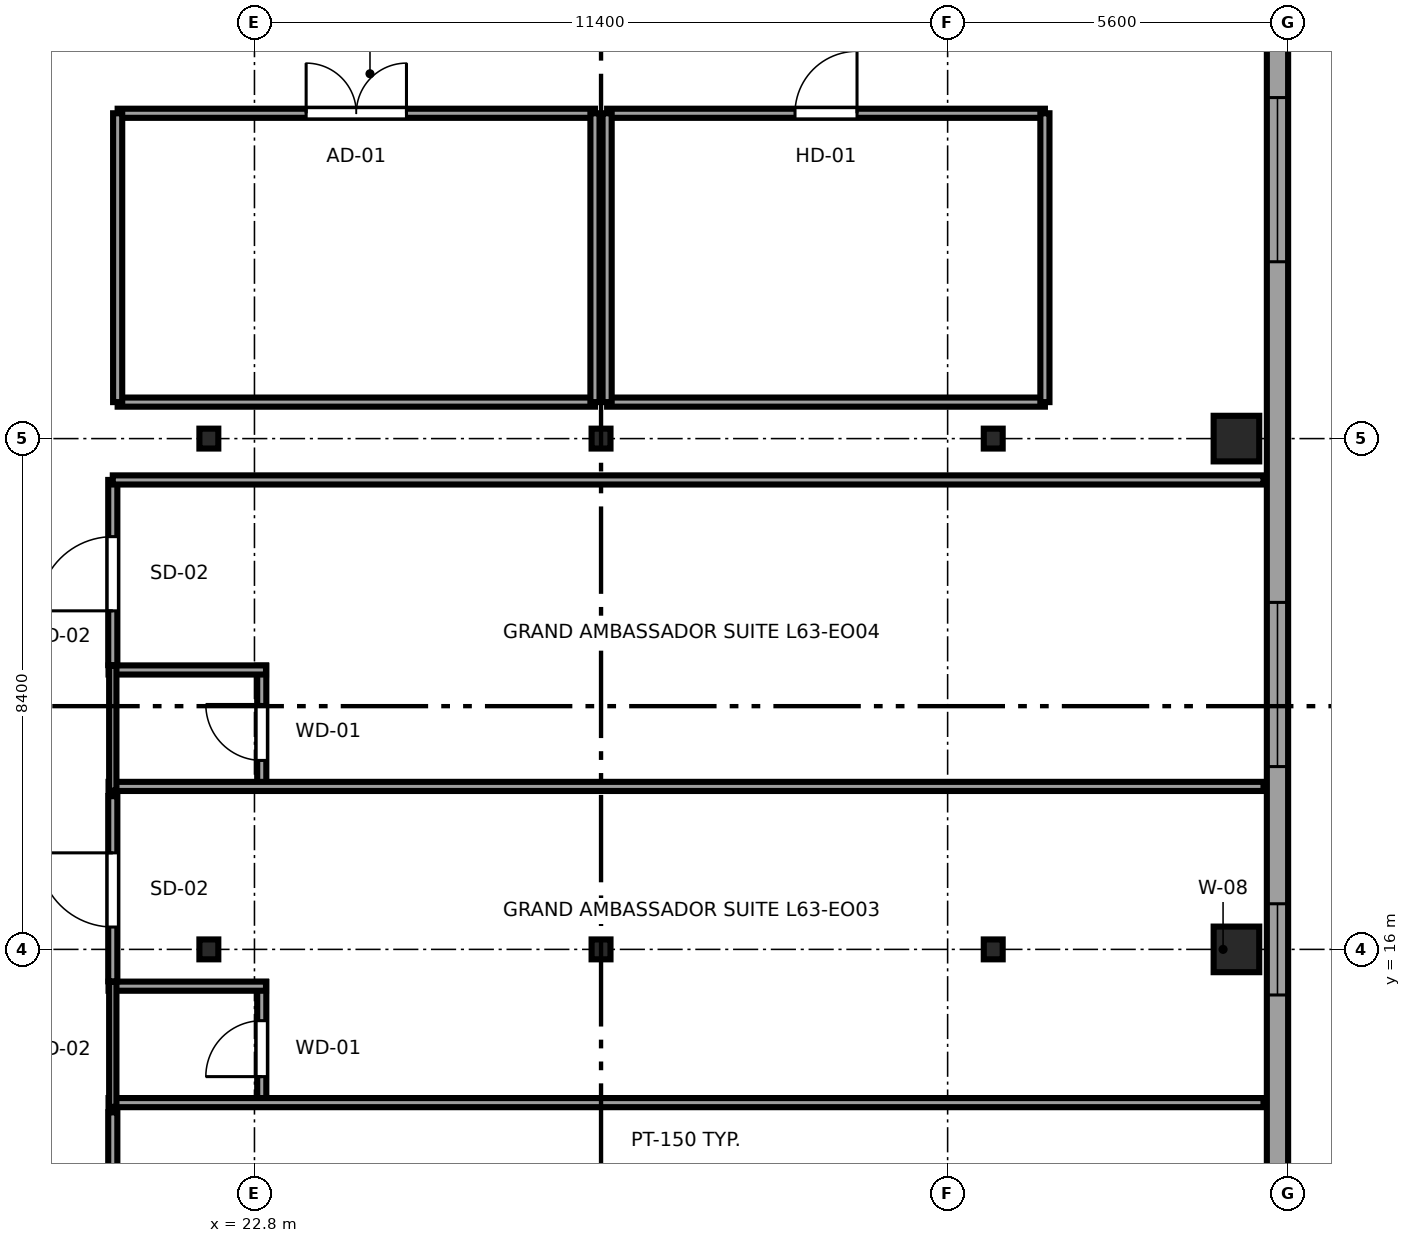
"""IFC4 building model, lengths in metres.
Left out: names, types, materials, properties, quantities, classifications, styles, units other than length and angle.
Written with IfcOpenShell. Run it as: python <this file> out.ifc"""

import sys

from ifc_helpers import new_model, si_unit, direction, frame, frame_2d, origin, origin_2d, place, context, subcontext, project, spatial, rectangle, i_section, extrude, source, transform, mapped, element, fill, save


model = new_model("IFC4")
c1 = context("Model", 3, precision=1e-05, world=origin(), true_north=direction((0.0, 1.0)))
c2 = subcontext(c1, "Body", "Model", "MODEL_VIEW")
j1 = project(units=[si_unit("LENGTHUNIT", "METRE"), si_unit("PLANEANGLEUNIT", "RADIAN")], contexts=[c1])
p1 = place(None, origin())
s1 = spatial("IfcSite", under=j1, at=p1, CompositionType="ELEMENT")
p2 = place(p1, origin())
s2 = spatial("IfcBuilding", under=s1, at=p2, CompositionType="ELEMENT")
p3 = place(p2, frame((0.0, 0.0, 238.1)))
s3 = spatial("IfcBuildingStorey", under=s2, at=p3, CompositionType="ELEMENT", Elevation=238.1)
m1 = source(origin(), c2, "Body", "SweptSolid", [
    extrude(i_section(OverallWidth=0.311, OverallDepth=0.327, WebThickness=0.016, FlangeThickness=0.025, FilletRadius=0.017, at=origin_2d()), origin(), (0.0, 0.0, 1.0), 3.55),
])
for number, where, z_axis, x_axis in (
    (1, (22.05, 16.0, 0.0), (0.0, 0.0, 1.0), (1.0, 0.0, 0.0)),
    (2, (22.05, 24.4, 0.0), (0.0, 0.0, 1.0), (1.0, 0.0, 0.0)),
    (3, (28.5, 16.0, 0.0), (0.0, 0.0, 1.0), (1.0, 0.0, 0.0)),
    (4, (28.5, 24.4, 0.0), (0.0, 0.0, 1.0), (1.0, 0.0, 0.0)),
    (5, (34.95, 16.0, 0.0), (0.0, 0.0, 1.0), (1.0, 0.0, 0.0)),
    (6, (34.95, 24.4, 0.0), (0.0, 0.0, 1.0), (1.0, 0.0, 0.0)),
):
    element("IfcColumn", number, at=place(p3, frame(where, z_axis=z_axis, x_axis=x_axis)), inside=s3, PredefinedType="COLUMN", context=c2, shape_type="MappedRepresentation", body=[
        mapped(m1, transform((0.0, 0.0, 0.0), x_axis=(1.0, 0.0, 0.0), y_axis=(0.0, 1.0, 0.0), z_axis=(0.0, 0.0, 1.0), scale=1.0)),
    ])
m2 = source(origin(), c2, "Body", "SweptSolid", [
    extrude(rectangle(XDim=0.75, YDim=0.75, at=origin_2d()), origin(), (0.0, 0.0, 1.0), 3.55),
])
for number, where, z_axis, x_axis in (
    (7, (38.95, 16.0, 0.0), (0.0, 0.0, 1.0), (1.0, 0.0, 0.0)),
    (8, (38.95, 24.4, 0.0), (0.0, 0.0, 1.0), (1.0, 0.0, 0.0)),
):
    element("IfcColumn", number, at=place(p3, frame(where, z_axis=z_axis, x_axis=x_axis)), inside=s3, PredefinedType="COLUMN", context=c2, shape_type="MappedRepresentation", body=[
        mapped(m2, transform((0.0, 0.0, 0.0), x_axis=(1.0, 0.0, 0.0), y_axis=(0.0, 1.0, 0.0), z_axis=(0.0, 0.0, 1.0), scale=1.0)),
    ])
p4 = place(p3, frame((39.625, 7.017, 0.0), z_axis=(0.0, 0.0, 1.0), x_axis=(0.0, 1.0, 0.0)))
e9 = element("IfcWall", 9, at=p4, inside=s3, PredefinedType="SOLIDWALL", context=c2, shape_type="SweptSolid", body=[
    extrude(rectangle(XDim=24.579, YDim=0.35, at=frame_2d((12.29, 0.0))), origin(), (0.0, 0.0, 1.0), 3.29),
])
p5 = place(p4, frame((2.138, 0.0, 0.68)))
e10 = element("IfcOpeningElement", 10, at=p5, cuts=e9, PredefinedType="OPENING", context=c2, shape_type="SweptSolid", body=[
    extrude(rectangle(XDim=2.7, YDim=1.95, at=frame_2d((1.35, 0.975))), frame((0.0, 0.185, 0.0), z_axis=(0.0, -1.0, 0.0), x_axis=(1.0, 0.0, 0.0)), (0.0, 0.0, 1.0), 0.37),
])
p6 = place(p4, frame((11.989, 0.0, 0.68)))
e11 = element("IfcOpeningElement", 11, at=p6, cuts=e9, PredefinedType="OPENING", context=c2, shape_type="SweptSolid", body=[
    extrude(rectangle(XDim=2.7, YDim=1.95, at=frame_2d((1.35, 0.975))), frame((0.0, 0.185, 0.0), z_axis=(0.0, -1.0, 0.0), x_axis=(1.0, 0.0, 0.0)), (0.0, 0.0, 1.0), 0.37),
])
p7 = place(p4, frame((20.291, 0.0, 0.68)))
e12 = element("IfcOpeningElement", 12, at=p7, cuts=e9, PredefinedType="OPENING", context=c2, shape_type="SweptSolid", body=[
    extrude(rectangle(XDim=2.7, YDim=1.95, at=frame_2d((1.35, 0.975))), frame((0.0, 0.185, 0.0), z_axis=(0.0, -1.0, 0.0), x_axis=(1.0, 0.0, 0.0)), (0.0, 0.0, 1.0), 0.37),
])
p8 = place(p4, frame((8.233, 0.0, 0.62)))
e13 = element("IfcOpeningElement", 13, at=p8, cuts=e9, PredefinedType="OPENING", context=c2, shape_type="SweptSolid", body=[
    extrude(rectangle(XDim=1.5, YDim=1.55, at=frame_2d((0.75, 0.775))), frame((0.0, 0.185, 0.0), z_axis=(0.0, -1.0, 0.0), x_axis=(1.0, 0.0, 0.0)), (0.0, 0.0, 1.0), 0.37),
])
p9 = place(p3, frame((22.92, 13.41, 0.0), z_axis=(0.0, 0.0, 1.0), x_axis=(0.0, 1.0, 0.0)))
e14 = element("IfcWall", 14, at=p9, inside=s3, PredefinedType="PARTITIONING", context=c2, shape_type="SweptSolid", body=[
    extrude(rectangle(XDim=2.055, YDim=0.15, at=frame_2d((1.028, 0.0))), origin(), (0.0, 0.0, 1.0), 3.29),
])
p10 = place(p9, frame((0.498, 0.0, 0.0)))
e15 = element("IfcOpeningElement", 15, at=p10, cuts=e14, PredefinedType="OPENING", context=c2, shape_type="SweptSolid", body=[
    extrude(rectangle(XDim=0.92, YDim=2.01, at=frame_2d((0.46, 1.005))), frame((0.0, 0.085, 0.0), z_axis=(0.0, -1.0, 0.0), x_axis=(1.0, 0.0, 0.0)), (0.0, 0.0, 1.0), 0.17),
])
p11 = place(p3, frame((20.4, 13.48, 0.0), z_axis=(0.0, 0.0, 1.0), x_axis=(1.0, 0.0, 0.0)))
e16 = element("IfcWall", 16, at=p11, inside=s3, PredefinedType="PARTITIONING", context=c2, shape_type="SweptSolid", body=[
    extrude(rectangle(XDim=18.995, YDim=0.15, at=frame_2d((9.498, 0.0))), origin(), (0.0, 0.0, 1.0), 3.29),
])
p12 = place(p3, frame((20.4, 15.395, 0.0), z_axis=(0.0, 0.0, 1.0), x_axis=(1.0, 0.0, 0.0)))
e17 = element("IfcWall", 17, at=p12, inside=s3, PredefinedType="PARTITIONING", context=c2, shape_type="SweptSolid", body=[
    extrude(rectangle(XDim=2.59, YDim=0.15, at=frame_2d((1.295, 0.0))), origin(), (0.0, 0.0, 1.0), 3.29),
])
p13 = place(p3, frame((20.47, 13.41, 0.0), z_axis=(0.0, 0.0, 1.0), x_axis=(0.0, 1.0, 0.0)))
e18 = element("IfcWall", 18, at=p13, inside=s3, PredefinedType="PLUMBINGWALL", context=c2, shape_type="SweptSolid", body=[
    extrude(rectangle(XDim=2.055, YDim=0.12, at=frame_2d((1.028, 0.0))), origin(), (0.0, 0.0, 1.0), 3.29),
])
p14 = place(p3, frame((22.92, 18.61, 0.0), z_axis=(0.0, 0.0, 1.0), x_axis=(0.0, 1.0, 0.0)))
e19 = element("IfcWall", 19, at=p14, inside=s3, PredefinedType="PARTITIONING", context=c2, shape_type="SweptSolid", body=[
    extrude(rectangle(XDim=2.055, YDim=0.15, at=frame_2d((1.027, 0.0))), origin(), (0.0, 0.0, 1.0), 3.29),
])
p15 = place(p14, frame((0.498, 0.0, 0.0)))
e20 = element("IfcOpeningElement", 20, at=p15, cuts=e19, PredefinedType="OPENING", context=c2, shape_type="SweptSolid", body=[
    extrude(rectangle(XDim=0.92, YDim=2.01, at=frame_2d((0.46, 1.005))), frame((0.0, 0.085, 0.0), z_axis=(0.0, -1.0, 0.0), x_axis=(1.0, 0.0, 0.0)), (0.0, 0.0, 1.0), 0.17),
])
p16 = place(p3, frame((20.4, 18.68, 0.0), z_axis=(0.0, 0.0, 1.0), x_axis=(1.0, 0.0, 0.0)))
e21 = element("IfcWall", 21, at=p16, inside=s3, PredefinedType="PARTITIONING", context=c2, shape_type="SweptSolid", body=[
    extrude(rectangle(XDim=18.995, YDim=0.15, at=frame_2d((9.498, 0.0))), origin(), (0.0, 0.0, 1.0), 3.29),
])
p17 = place(p3, frame((20.4, 20.595, 0.0), z_axis=(0.0, 0.0, 1.0), x_axis=(1.0, 0.0, 0.0)))
e22 = element("IfcWall", 22, at=p17, inside=s3, PredefinedType="PARTITIONING", context=c2, shape_type="SweptSolid", body=[
    extrude(rectangle(XDim=2.59, YDim=0.15, at=frame_2d((1.295, 0.0))), origin(), (0.0, 0.0, 1.0), 3.29),
])
p18 = place(p3, frame((20.47, 18.61, 0.0), z_axis=(0.0, 0.0, 1.0), x_axis=(0.0, 1.0, 0.0)))
e23 = element("IfcWall", 23, at=p18, inside=s3, PredefinedType="PLUMBINGWALL", context=c2, shape_type="SweptSolid", body=[
    extrude(rectangle(XDim=2.055, YDim=0.12, at=frame_2d((1.027, 0.0))), origin(), (0.0, 0.0, 1.0), 3.29),
])
p19 = place(p3, frame((20.47, 10.275, 0.0), z_axis=(0.0, 0.0, 1.0), x_axis=(0.0, 1.0, 0.0)))
e24 = element("IfcWall", 24, at=p19, inside=s3, PredefinedType="PARTITIONING", context=c2, shape_type="SweptSolid", body=[
    extrude(rectangle(XDim=3.045, YDim=0.15, at=frame_2d((1.522, 0.0))), origin(), (0.0, 0.0, 1.0), 3.29),
])
p20 = place(p19, frame((0.893, 0.0, 0.0)))
e25 = element("IfcOpeningElement", 25, at=p20, cuts=e24, PredefinedType="OPENING", context=c2, shape_type="SweptSolid", body=[
    extrude(rectangle(XDim=1.22, YDim=2.08, at=frame_2d((0.61, 1.04))), frame((0.0, 0.085, 0.0), z_axis=(0.0, -1.0, 0.0), x_axis=(1.0, 0.0, 0.0)), (0.0, 0.0, 1.0), 0.17),
])
p21 = place(p3, frame((20.47, 15.475, 0.0), z_axis=(0.0, 0.0, 1.0), x_axis=(0.0, 1.0, 0.0)))
e26 = element("IfcWall", 26, at=p21, inside=s3, PredefinedType="PARTITIONING", context=c2, shape_type="SweptSolid", body=[
    extrude(rectangle(XDim=3.045, YDim=0.15, at=frame_2d((1.522, 0.0))), origin(), (0.0, 0.0, 1.0), 3.29),
])
p22 = place(p21, frame((0.893, 0.0, 0.0)))
e27 = element("IfcOpeningElement", 27, at=p22, cuts=e26, PredefinedType="OPENING", context=c2, shape_type="SweptSolid", body=[
    extrude(rectangle(XDim=1.22, YDim=2.08, at=frame_2d((0.61, 1.04))), frame((0.0, 0.085, 0.0), z_axis=(0.0, -1.0, 0.0), x_axis=(1.0, 0.0, 0.0)), (0.0, 0.0, 1.0), 0.17),
])
p23 = place(p3, frame((20.47, 20.675, 0.0), z_axis=(0.0, 0.0, 1.0), x_axis=(0.0, 1.0, 0.0)))
e28 = element("IfcWall", 28, at=p23, inside=s3, PredefinedType="PARTITIONING", context=c2, shape_type="SweptSolid", body=[
    extrude(rectangle(XDim=3.045, YDim=0.15, at=frame_2d((1.522, 0.0))), origin(), (0.0, 0.0, 1.0), 3.29),
])
p24 = place(p23, frame((0.893, 0.0, 0.0)))
e29 = element("IfcOpeningElement", 29, at=p24, cuts=e28, PredefinedType="OPENING", context=c2, shape_type="SweptSolid", body=[
    extrude(rectangle(XDim=1.22, YDim=2.08, at=frame_2d((0.61, 1.04))), frame((0.0, 0.085, 0.0), z_axis=(0.0, -1.0, 0.0), x_axis=(1.0, 0.0, 0.0)), (0.0, 0.0, 1.0), 0.17),
])
p25 = place(p3, frame((20.47, 23.72, 0.0), z_axis=(0.0, 0.0, 1.0), x_axis=(1.0, 0.0, 0.0)))
e30 = element("IfcWall", 30, at=p25, inside=s3, PredefinedType="PARTITIONING", context=c2, shape_type="SweptSolid", body=[
    extrude(rectangle(XDim=18.925, YDim=0.15, at=frame_2d((9.462, 0.0))), origin(), (0.0, 0.0, 1.0), 3.29),
])
p26 = place(p3, frame((20.55, 25.0, 0.0), z_axis=(0.0, 0.0, 1.0), x_axis=(1.0, 0.0, 0.0)))
e31 = element("IfcWall", 31, at=p26, inside=s3, PredefinedType="PARTITIONING", context=c2, shape_type="SweptSolid", body=[
    extrude(rectangle(XDim=7.85, YDim=0.15, at=frame_2d((3.925, 0.0))), origin(), (0.0, 0.0, 1.0), 3.29),
])
p27 = place(p3, frame((20.55, 29.75, 0.0), z_axis=(0.0, 0.0, 1.0), x_axis=(1.0, 0.0, 0.0)))
e32 = element("IfcWall", 32, at=p27, inside=s3, PredefinedType="PARTITIONING", context=c2, shape_type="SweptSolid", body=[
    extrude(rectangle(XDim=7.85, YDim=0.15, at=frame_2d((3.925, 0.0))), origin(), (0.0, 0.0, 1.0), 3.29),
])
p28 = place(p27, frame((3.1, 0.0, 0.0)))
e33 = element("IfcOpeningElement", 33, at=p28, cuts=e32, PredefinedType="OPENING", context=c2, shape_type="SweptSolid", body=[
    extrude(rectangle(XDim=1.65, YDim=2.15, at=frame_2d((0.825, 1.075))), frame((0.0, 0.085, 0.0), z_axis=(0.0, -1.0, 0.0), x_axis=(1.0, 0.0, 0.0)), (0.0, 0.0, 1.0), 0.17),
])
p29 = place(p3, frame((20.55, 25.0, 0.0), z_axis=(0.0, 0.0, 1.0), x_axis=(0.0, 1.0, 0.0)))
e34 = element("IfcWall", 34, at=p29, inside=s3, PredefinedType="PARTITIONING", context=c2, shape_type="SweptSolid", body=[
    extrude(rectangle(XDim=4.75, YDim=0.15, at=frame_2d((2.375, 0.0))), origin(), (0.0, 0.0, 1.0), 3.29),
])
p30 = place(p3, frame((28.4, 25.0, 0.0), z_axis=(0.0, 0.0, 1.0), x_axis=(0.0, 1.0, 0.0)))
e35 = element("IfcWall", 35, at=p30, inside=s3, PredefinedType="PARTITIONING", context=c2, shape_type="SweptSolid", body=[
    extrude(rectangle(XDim=4.75, YDim=0.15, at=frame_2d((2.375, 0.0))), origin(), (0.0, 0.0, 1.0), 2.08),
])
p31 = place(p3, frame((28.6, 25.0, 0.0), z_axis=(0.0, 0.0, 1.0), x_axis=(1.0, 0.0, 0.0)))
e36 = element("IfcWall", 36, at=p31, inside=s3, PredefinedType="PARTITIONING", context=c2, shape_type="SweptSolid", body=[
    extrude(rectangle(XDim=7.2, YDim=0.15, at=frame_2d((3.6, 0.0))), origin(), (0.0, 0.0, 1.0), 3.29),
])
p32 = place(p3, frame((28.6, 29.75, 0.0), z_axis=(0.0, 0.0, 1.0), x_axis=(1.0, 0.0, 0.0)))
e37 = element("IfcWall", 37, at=p32, inside=s3, PredefinedType="PARTITIONING", context=c2, shape_type="SweptSolid", body=[
    extrude(rectangle(XDim=7.2, YDim=0.15, at=frame_2d((3.6, 0.0))), origin(), (0.0, 0.0, 1.0), 3.29),
])
p33 = place(p32, frame((3.09, 0.0, 0.0)))
e38 = element("IfcOpeningElement", 38, at=p33, cuts=e37, PredefinedType="OPENING", context=c2, shape_type="SweptSolid", body=[
    extrude(rectangle(XDim=1.02, YDim=2.03, at=frame_2d((0.51, 1.015))), frame((0.0, 0.085, 0.0), z_axis=(0.0, -1.0, 0.0), x_axis=(1.0, 0.0, 0.0)), (0.0, 0.0, 1.0), 0.17),
])
p34 = place(p3, frame((28.6, 25.0, 0.0), z_axis=(0.0, 0.0, 1.0), x_axis=(0.0, 1.0, 0.0)))
e39 = element("IfcWall", 39, at=p34, inside=s3, PredefinedType="PARTITIONING", context=c2, shape_type="SweptSolid", body=[
    extrude(rectangle(XDim=4.75, YDim=0.15, at=frame_2d((2.375, 0.0))), origin(), (0.0, 0.0, 1.0), 2.08),
])
p35 = place(p3, frame((35.8, 25.0, 0.0), z_axis=(0.0, 0.0, 1.0), x_axis=(0.0, 1.0, 0.0)))
e40 = element("IfcWall", 40, at=p35, inside=s3, PredefinedType="PARTITIONING", context=c2, shape_type="SweptSolid", body=[
    extrude(rectangle(XDim=4.75, YDim=0.15, at=frame_2d((2.375, 0.0))), origin(), (0.0, 0.0, 1.0), 3.29),
])
m3 = source(origin(), c2, "Body", "SweptSolid", [
    extrude(rectangle(XDim=2.7, YDim=1.95, at=frame_2d((1.35, 0.975))), frame((0.0, 0.09, 0.0), z_axis=(0.0, -1.0, 0.0), x_axis=(1.0, 0.0, 0.0)), (0.0, 0.0, 1.0), 0.06),
])
p36 = place(p6, origin())
e41 = element("IfcWindow", 41, at=p36, inside=s3, PartitioningType="TRIPLE_PANEL_HORIZONTAL", PredefinedType="WINDOW", context=c2, shape_type="MappedRepresentation", body=[
    mapped(m3, transform((0.0, 0.0, 0.0), x_axis=(1.0, 0.0, 0.0), y_axis=(0.0, 1.0, 0.0), z_axis=(0.0, 0.0, 1.0), scale=1.0)),
])
fill(e11, e41)
p37 = place(p7, origin())
e42 = element("IfcWindow", 42, at=p37, inside=s3, PartitioningType="TRIPLE_PANEL_HORIZONTAL", PredefinedType="WINDOW", context=c2, shape_type="MappedRepresentation", body=[
    mapped(m3, transform((0.0, 0.0, 0.0), x_axis=(1.0, 0.0, 0.0), y_axis=(0.0, 1.0, 0.0), z_axis=(0.0, 0.0, 1.0), scale=1.0)),
])
fill(e12, e42)
m4 = source(origin(), c2, "Body", "SweptSolid", [
    extrude(rectangle(XDim=1.5, YDim=1.55, at=frame_2d((0.75, 0.775))), frame((0.0, 0.09, 0.0), z_axis=(0.0, -1.0, 0.0), x_axis=(1.0, 0.0, 0.0)), (0.0, 0.0, 1.0), 0.06),
])
p38 = place(p8, origin())
e43 = element("IfcWindow", 43, at=p38, inside=s3, PartitioningType="SINGLE_PANEL", PredefinedType="WINDOW", context=c2, shape_type="MappedRepresentation", body=[
    mapped(m4, transform((0.0, 0.0, 0.0), x_axis=(1.0, 0.0, 0.0), y_axis=(0.0, 1.0, 0.0), z_axis=(0.0, 0.0, 1.0), scale=1.0)),
])
fill(e13, e43)
m5 = source(origin(), c2, "Body", "SweptSolid", [
    extrude(rectangle(XDim=0.92, YDim=2.01, at=frame_2d((0.46, 1.005))), frame((0.0, 0.025, 0.0), z_axis=(0.0, -1.0, 0.0), x_axis=(1.0, 0.0, 0.0)), (0.0, 0.0, 1.0), 0.05),
])
p39 = place(p10, origin())
e44 = element("IfcDoor", 44, at=p39, inside=s3, OperationType="SINGLE_SWING_LEFT", PredefinedType="DOOR", context=c2, shape_type="MappedRepresentation", body=[
    mapped(m5, transform((0.0, 0.0, 0.0), x_axis=(1.0, 0.0, 0.0), y_axis=(0.0, 1.0, 0.0), z_axis=(0.0, 0.0, 1.0), scale=1.0)),
])
fill(e15, e44)
p40 = place(p15, origin())
e45 = element("IfcDoor", 45, at=p40, inside=s3, OperationType="SINGLE_SWING_RIGHT", PredefinedType="DOOR", context=c2, shape_type="MappedRepresentation", body=[
    mapped(m5, transform((0.0, 0.0, 0.0), x_axis=(1.0, 0.0, 0.0), y_axis=(0.0, 1.0, 0.0), z_axis=(0.0, 0.0, 1.0), scale=1.0)),
])
fill(e20, e45)
m6 = source(origin(), c2, "Body", "SweptSolid", [
    extrude(rectangle(XDim=1.22, YDim=2.08, at=frame_2d((0.61, 1.04))), frame((0.0, 0.025, 0.0), z_axis=(0.0, -1.0, 0.0), x_axis=(1.0, 0.0, 0.0)), (0.0, 0.0, 1.0), 0.05),
])
p41 = place(p22, origin())
e46 = element("IfcDoor", 46, at=p41, inside=s3, OperationType="SINGLE_SWING_RIGHT", PredefinedType="DOOR", context=c2, shape_type="MappedRepresentation", body=[
    mapped(m6, transform((0.0, 0.0, 0.0), x_axis=(1.0, 0.0, 0.0), y_axis=(0.0, 1.0, 0.0), z_axis=(0.0, 0.0, 1.0), scale=1.0)),
])
fill(e27, e46)
p42 = place(p24, origin())
e47 = element("IfcDoor", 47, at=p42, inside=s3, OperationType="SINGLE_SWING_LEFT", PredefinedType="DOOR", context=c2, shape_type="MappedRepresentation", body=[
    mapped(m6, transform((0.0, 0.0, 0.0), x_axis=(1.0, 0.0, 0.0), y_axis=(0.0, 1.0, 0.0), z_axis=(0.0, 0.0, 1.0), scale=1.0)),
])
fill(e29, e47)
m7 = source(origin(), c2, "Body", "SweptSolid", [
    extrude(rectangle(XDim=1.65, YDim=2.15, at=frame_2d((0.825, 1.075))), frame((0.0, 0.025, 0.0), z_axis=(0.0, -1.0, 0.0), x_axis=(1.0, 0.0, 0.0)), (0.0, 0.0, 1.0), 0.05),
])
p43 = place(p28, origin())
e48 = element("IfcDoor", 48, at=p43, inside=s3, OperationType="DOUBLE_DOOR_SINGLE_SWING", PredefinedType="DOOR", context=c2, shape_type="MappedRepresentation", body=[
    mapped(m7, transform((0.0, 0.0, 0.0), x_axis=(1.0, 0.0, 0.0), y_axis=(0.0, 1.0, 0.0), z_axis=(0.0, 0.0, 1.0), scale=1.0)),
])
fill(e33, e48)
m8 = source(origin(), c2, "Body", "SweptSolid", [
    extrude(rectangle(XDim=1.02, YDim=2.03, at=frame_2d((0.51, 1.015))), frame((0.0, 0.025, 0.0), z_axis=(0.0, -1.0, 0.0), x_axis=(1.0, 0.0, 0.0)), (0.0, 0.0, 1.0), 0.05),
])
p44 = place(p33, origin())
e49 = element("IfcDoor", 49, at=p44, inside=s3, OperationType="SINGLE_SWING_RIGHT", PredefinedType="DOOR", context=c2, shape_type="MappedRepresentation", body=[
    mapped(m8, transform((0.0, 0.0, 0.0), x_axis=(1.0, 0.0, 0.0), y_axis=(0.0, 1.0, 0.0), z_axis=(0.0, 0.0, 1.0), scale=1.0)),
])
fill(e38, e49)
save(model, sys.argv[1])
